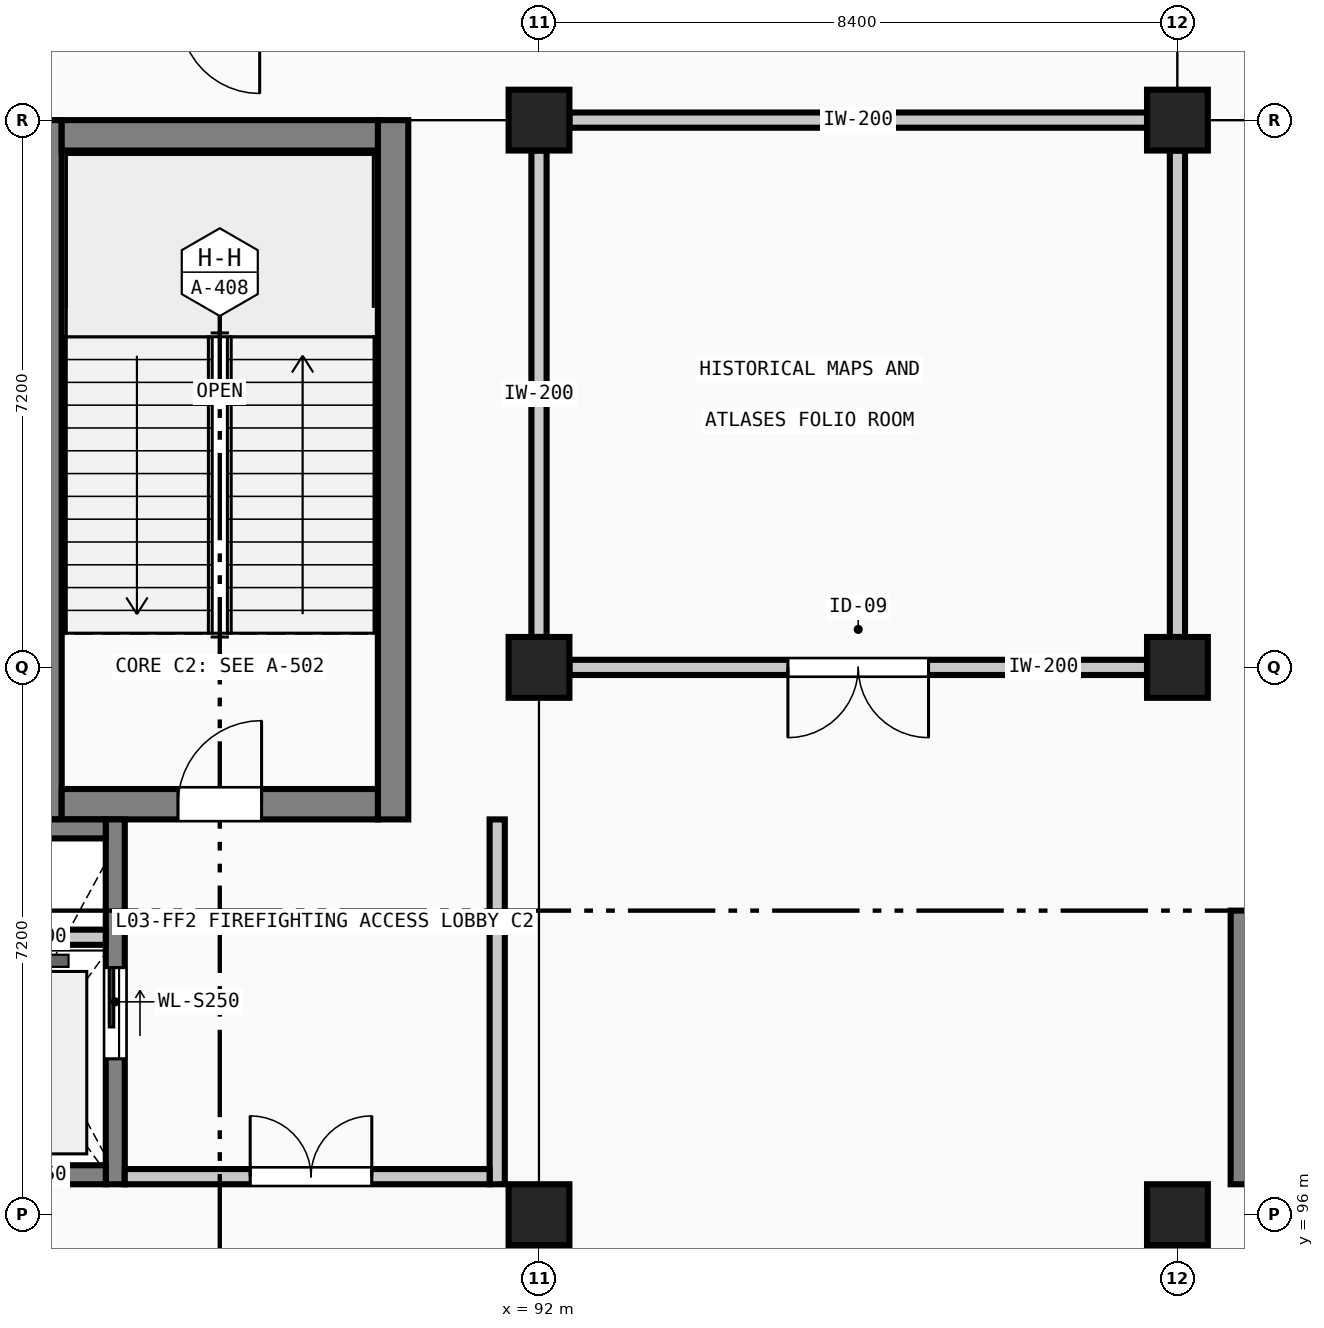
"""IFC4 building model, lengths in metres.
Left out: names, types, materials, properties, quantities, classifications, styles, units other than length and angle.
Written with IfcOpenShell. Run it as: python <this file> out.ifc"""

import sys

from ifc_helpers import new_model, si_unit, direction, frame, frame_2d, origin, origin_2d, place, context, subcontext, project, spatial, rectangle, extrude, element, fill, save


model = new_model("IFC4")
c1 = context("Model", 3, precision=1e-05, world=origin(), true_north=direction((0.0, 1.0)))
c2 = subcontext(c1, "Body", "Model", "MODEL_VIEW")
j1 = project(units=[si_unit("LENGTHUNIT", "METRE"), si_unit("PLANEANGLEUNIT", "RADIAN")], contexts=[c1])
p1 = place(None, origin())
s1 = spatial("IfcSite", under=j1, at=p1, CompositionType="ELEMENT")
p2 = place(p1, origin())
s2 = spatial("IfcBuilding", under=s1, at=p2, CompositionType="ELEMENT")
p3 = place(p2, frame((0.0, 0.0, 14.4)))
s3 = spatial("IfcBuildingStorey", under=s2, at=p3, CompositionType="ELEMENT", Elevation=14.4)
for number, where, z_axis, x_axis in (
    (1, (92.0, 96.0, 0.0), (0.0, 0.0, 1.0), (1.0, 0.0, 0.0)),
    (2, (92.0, 103.2, 0.0), (0.0, 0.0, 1.0), (1.0, 0.0, 0.0)),
    (3, (92.0, 110.4, 0.0), (0.0, 0.0, 1.0), (1.0, 0.0, 0.0)),
    (4, (100.4, 96.0, 0.0), (0.0, 0.0, 1.0), (1.0, 0.0, 0.0)),
    (5, (100.4, 103.2, 0.0), (0.0, 0.0, 1.0), (1.0, 0.0, 0.0)),
    (6, (100.4, 110.4, 0.0), (0.0, 0.0, 1.0), (1.0, 0.0, 0.0)),
):
    element("IfcColumn", number, at=place(p3, frame(where, z_axis=z_axis, x_axis=x_axis)), inside=s3, PredefinedType="COLUMN", context=c2, shape_type="SweptSolid", body=[
        extrude(rectangle(XDim=0.8, YDim=0.8, at=origin_2d()), origin(), (0.0, 0.0, 1.0), 4.48),
    ])
for number, where, z_axis, x_axis in (
    (7, (85.52, 101.2, 0.0), (0.0, 0.0, 1.0), (0.0, 1.0, 0.0)),
    (8, (90.08, 110.4, 0.0), (0.0, 0.0, 1.0), (0.0, -1.0, 0.0)),
):
    element("IfcWall", number, at=place(p3, frame(where, z_axis=z_axis, x_axis=x_axis)), inside=s3, PredefinedType="SHEAR", context=c2, shape_type="SweptSolid", body=[
        extrude(rectangle(XDim=9.2, YDim=0.4, at=frame_2d((4.6, 0.0))), origin(), (0.0, 0.0, 1.0), 4.18),
    ])
p4 = place(p3, frame((89.88, 101.4, 0.0), z_axis=(0.0, 0.0, 1.0), x_axis=(-1.0, 0.0, 0.0)))
e9 = element("IfcWall", 9, at=p4, inside=s3, PredefinedType="SHEAR", context=c2, shape_type="SweptSolid", body=[
    extrude(rectangle(XDim=4.16, YDim=0.4, at=frame_2d((2.08, 0.0))), origin(), (0.0, 0.0, 1.0), 4.18),
])
p5 = place(p4, frame((1.53, 0.0, 0.0)))
e10 = element("IfcOpeningElement", 10, at=p5, cuts=e9, PredefinedType="OPENING", context=c2, shape_type="SweptSolid", body=[
    extrude(rectangle(XDim=1.1, YDim=2.2, at=frame_2d((0.55, 1.1))), frame((0.0, 0.21, 0.0), z_axis=(0.0, -1.0, 0.0), x_axis=(1.0, 0.0, 0.0)), (0.0, 0.0, 1.0), 0.42),
])
p6 = place(p3, frame((85.72, 110.2, 0.0), z_axis=(0.0, 0.0, 1.0), x_axis=(1.0, 0.0, 0.0)))
e11 = element("IfcWall", 11, at=p6, inside=s3, PredefinedType="SHEAR", context=c2, shape_type="SweptSolid", body=[
    extrude(rectangle(XDim=4.16, YDim=0.4, at=frame_2d((2.08, 0.0))), origin(), (0.0, 0.0, 1.0), 4.18),
])
p7 = place(p3, frame((86.425, 101.2, 0.0), z_axis=(0.0, 0.0, 1.0), x_axis=(0.0, -1.0, 0.0)))
e12 = element("IfcWall", 12, at=p7, inside=s3, PredefinedType="SOLIDWALL", context=c2, shape_type="SweptSolid", body=[
    extrude(rectangle(XDim=4.8, YDim=0.25, at=frame_2d((2.4, 0.0))), origin(), (0.0, 0.0, 1.0), 4.18),
])
p8 = place(p7, frame((1.95, 0.0, 0.0)))
e13 = element("IfcOpeningElement", 13, at=p8, cuts=e12, PredefinedType="OPENING", context=c2, shape_type="SweptSolid", body=[
    extrude(rectangle(XDim=1.2, YDim=2.2, at=frame_2d((0.6, 1.1))), frame((0.0, 0.135, 0.0), z_axis=(0.0, -1.0, 0.0), x_axis=(1.0, 0.0, 0.0)), (0.0, 0.0, 1.0), 0.27),
])
for number, where, z_axis, x_axis in (
    (14, (86.3, 96.525, 0.0), (0.0, 0.0, 1.0), (-1.0, 0.0, 0.0)),
    (15, (84.2, 101.075, 0.0), (0.0, 0.0, 1.0), (1.0, 0.0, 0.0)),
):
    element("IfcWall", number, at=place(p3, frame(where, z_axis=z_axis, x_axis=x_axis)), inside=s3, PredefinedType="SOLIDWALL", context=c2, shape_type="SweptSolid", body=[
        extrude(rectangle(XDim=2.1, YDim=0.25, at=frame_2d((1.05, 0.0))), origin(), (0.0, 0.0, 1.0), 4.18),
    ])
p9 = place(p3, frame((84.2, 99.65, 0.0), z_axis=(0.0, 0.0, 1.0), x_axis=(1.0, 0.0, 0.0)))
e16 = element("IfcWall", 16, at=p9, inside=s3, PredefinedType="SOLIDWALL", context=c2, shape_type="SweptSolid", body=[
    extrude(rectangle(XDim=2.1, YDim=0.2, at=frame_2d((1.05, 0.0))), origin(), (0.0, 0.0, 1.0), 4.18),
])
p10 = place(p3, frame((91.45, 101.2, 0.0), z_axis=(0.0, 0.0, 1.0), x_axis=(0.0, -1.0, 0.0)))
e17 = element("IfcWall", 17, at=p10, inside=s3, PredefinedType="SOLIDWALL", context=c2, shape_type="SweptSolid", body=[
    extrude(rectangle(XDim=4.8, YDim=0.2, at=frame_2d((2.4, 0.0))), origin(), (0.0, 0.0, 1.0), 4.18),
])
p11 = place(p3, frame((91.35, 96.5, 0.0), z_axis=(0.0, 0.0, 1.0), x_axis=(-1.0, 0.0, 0.0)))
e18 = element("IfcWall", 18, at=p11, inside=s3, PredefinedType="SOLIDWALL", context=c2, shape_type="SweptSolid", body=[
    extrude(rectangle(XDim=4.8, YDim=0.2, at=frame_2d((2.4, 0.0))), origin(), (0.0, 0.0, 1.0), 4.18),
])
p12 = place(p11, frame((1.55, 0.0, 0.0)))
e19 = element("IfcOpeningElement", 19, at=p12, cuts=e18, PredefinedType="OPENING", context=c2, shape_type="SweptSolid", body=[
    extrude(rectangle(XDim=1.6, YDim=2.2, at=frame_2d((0.8, 1.1))), frame((0.0, 0.11, 0.0), z_axis=(0.0, -1.0, 0.0), x_axis=(1.0, 0.0, 0.0)), (0.0, 0.0, 1.0), 0.22),
])
p13 = place(p3, frame((101.225, 96.4, 0.0), z_axis=(0.0, 0.0, 1.0), x_axis=(0.0, 1.0, 0.0)))
e20 = element("IfcWall", 20, at=p13, inside=s3, PredefinedType="SOLIDWALL", context=c2, shape_type="SweptSolid", body=[
    extrude(rectangle(XDim=3.6, YDim=0.25, at=frame_2d((1.8, 0.0))), origin(), (0.0, 0.0, 1.0), 4.23),
])
p14 = place(p3, frame((100.0, 103.2, 0.0), z_axis=(0.0, 0.0, 1.0), x_axis=(-1.0, 0.0, 0.0)))
e21 = element("IfcWall", 21, at=p14, inside=s3, PredefinedType="PARTITIONING", context=c2, shape_type="SweptSolid", body=[
    extrude(rectangle(XDim=7.6, YDim=0.2, at=frame_2d((3.8, 0.0))), origin(), (0.0, 0.0, 1.0), 3.43),
])
p15 = place(p14, frame((2.875, 0.0, 0.0)))
e22 = element("IfcOpeningElement", 22, at=p15, cuts=e21, PredefinedType="OPENING", context=c2, shape_type="SweptSolid", body=[
    extrude(rectangle(XDim=1.85, YDim=2.3, at=frame_2d((0.925, 1.15))), frame((0.0, 0.11, 0.0), z_axis=(0.0, -1.0, 0.0), x_axis=(1.0, 0.0, 0.0)), (0.0, 0.0, 1.0), 0.22),
])
p16 = place(p3, frame((92.4, 110.4, 0.0), z_axis=(0.0, 0.0, 1.0), x_axis=(1.0, 0.0, 0.0)))
e23 = element("IfcWall", 23, at=p16, inside=s3, PredefinedType="PARTITIONING", context=c2, shape_type="SweptSolid", body=[
    extrude(rectangle(XDim=7.6, YDim=0.2, at=frame_2d((3.8, 0.0))), origin(), (0.0, 0.0, 1.0), 3.43),
])
for number, where, z_axis, x_axis in (
    (24, (92.0, 103.6, 0.0), (0.0, 0.0, 1.0), (0.0, 1.0, 0.0)),
    (25, (100.4, 110.0, 0.0), (0.0, 0.0, 1.0), (0.0, -1.0, 0.0)),
):
    element("IfcWall", number, at=place(p3, frame(where, z_axis=z_axis, x_axis=x_axis)), inside=s3, PredefinedType="PARTITIONING", context=c2, shape_type="SweptSolid", body=[
        extrude(rectangle(XDim=6.4, YDim=0.2, at=frame_2d((3.2, 0.0))), origin(), (0.0, 0.0, 1.0), 3.53),
    ])
p17 = place(p5, frame((1.1, 0.0, 0.0), z_axis=(0.0, 0.0, 1.0), x_axis=(-1.0, 0.0, 0.0)))
e26 = element("IfcDoor", 26, at=p17, inside=s3, OperationType="SINGLE_SWING_RIGHT", PredefinedType="DOOR", context=c2, shape_type="SweptSolid", body=[
    extrude(rectangle(XDim=1.1, YDim=2.2, at=frame_2d((0.55, 1.1))), frame((0.0, 0.025, 0.0), z_axis=(0.0, -1.0, 0.0), x_axis=(1.0, 0.0, 0.0)), (0.0, 0.0, 1.0), 0.05),
])
fill(e10, e26)
p18 = place(p8, origin())
e27 = element("IfcDoor", 27, at=p18, inside=s3, OperationType="SLIDING_TO_LEFT", PredefinedType="DOOR", context=c2, shape_type="SweptSolid", body=[
    extrude(rectangle(XDim=1.2, YDim=2.2, at=frame_2d((0.6, 1.1))), frame((0.0, 0.025, 0.0), z_axis=(0.0, -1.0, 0.0), x_axis=(1.0, 0.0, 0.0)), (0.0, 0.0, 1.0), 0.05),
])
fill(e13, e27)
p19 = place(p12, frame((1.6, 0.0, 0.0), z_axis=(0.0, 0.0, 1.0), x_axis=(-1.0, 0.0, 0.0)))
e28 = element("IfcDoor", 28, at=p19, inside=s3, OperationType="DOUBLE_DOOR_SINGLE_SWING", PredefinedType="DOOR", context=c2, shape_type="SweptSolid", body=[
    extrude(rectangle(XDim=1.6, YDim=2.2, at=frame_2d((0.8, 1.1))), frame((0.0, 0.025, 0.0), z_axis=(0.0, -1.0, 0.0), x_axis=(1.0, 0.0, 0.0)), (0.0, 0.0, 1.0), 0.05),
])
fill(e19, e28)
p20 = place(p15, origin())
e29 = element("IfcDoor", 29, at=p20, inside=s3, OperationType="DOUBLE_DOOR_SINGLE_SWING", PredefinedType="DOOR", context=c2, shape_type="SweptSolid", body=[
    extrude(rectangle(XDim=1.85, YDim=2.3, at=frame_2d((0.925, 1.15))), frame((0.0, 0.025, 0.0), z_axis=(0.0, -1.0, 0.0), x_axis=(1.0, 0.0, 0.0)), (0.0, 0.0, 1.0), 0.05),
])
fill(e22, e29)
save(model, sys.argv[1])
